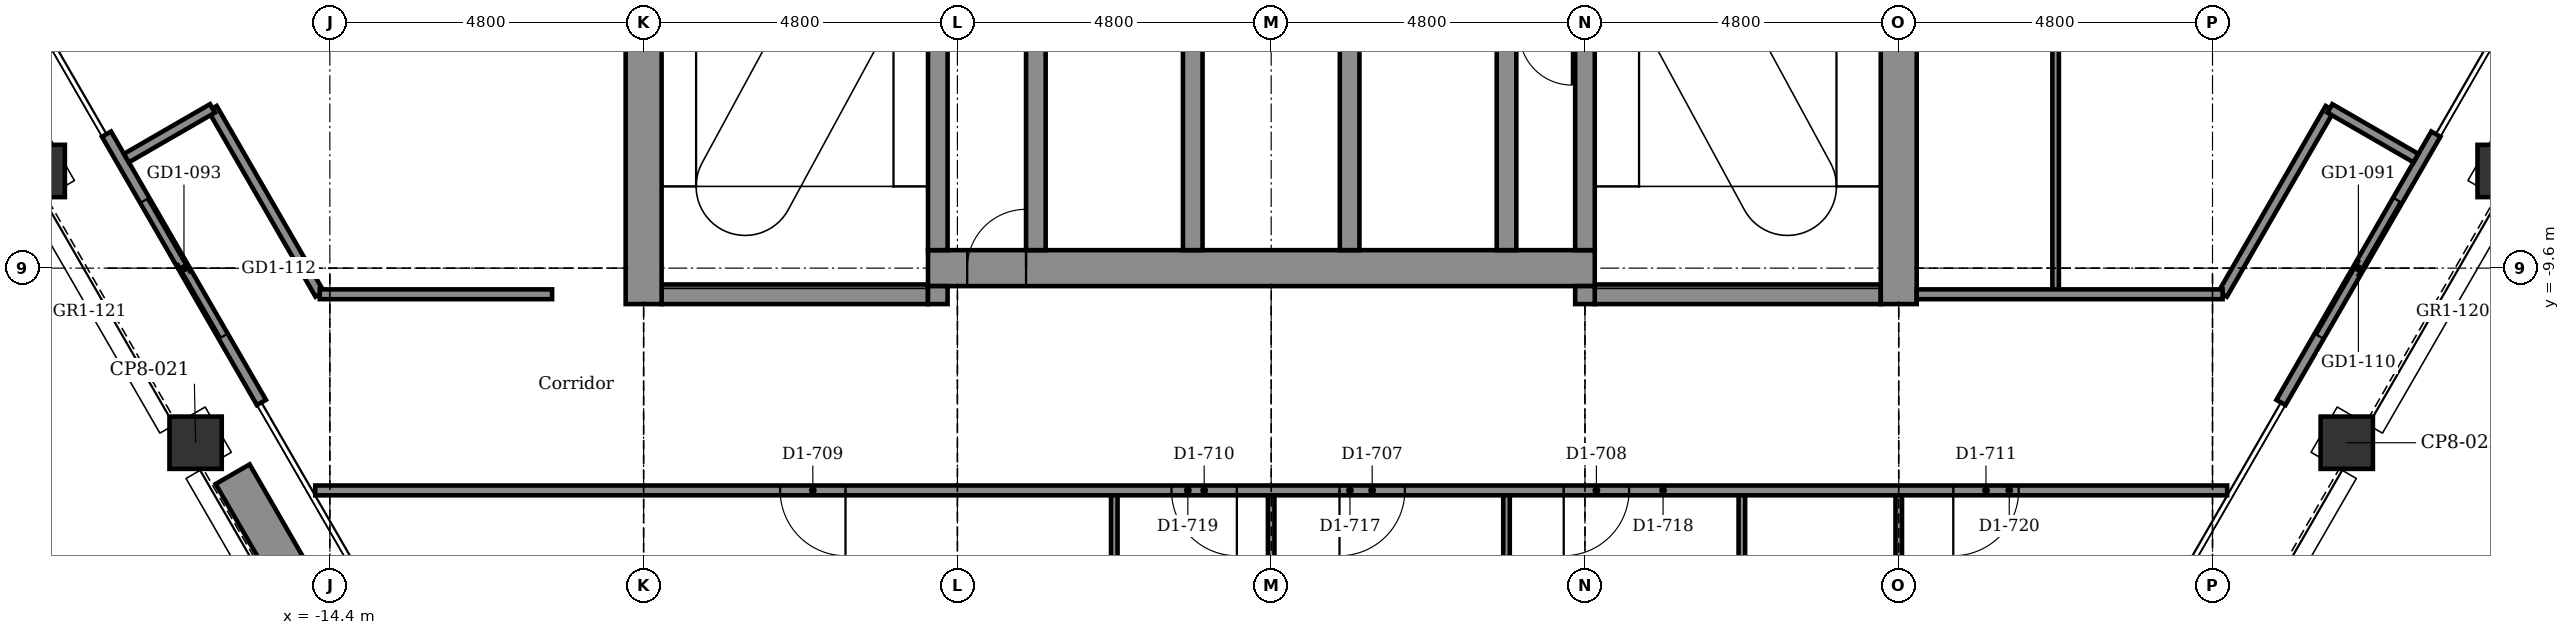
"""IFC4 building model, lengths in metres.
Left out: names, types, materials, properties, quantities, classifications, styles, units other than length and angle.
Written with IfcOpenShell. Run it as: python <this file> out.ifc"""

import sys

from ifc_helpers import new_model, si_unit, direction, frame, frame_2d, origin, origin_2d, place, context, subcontext, project, spatial, rectangle, extrude, element, fill, save


model = new_model("IFC4")
c1 = context("Model", 3, precision=1e-05, world=origin(), true_north=direction((0.0, 1.0)))
c2 = subcontext(c1, "Body", "Model", "MODEL_VIEW")
j1 = project(units=[si_unit("LENGTHUNIT", "METRE"), si_unit("PLANEANGLEUNIT", "RADIAN")], contexts=[c1])
p1 = place(None, origin())
s1 = spatial("IfcSite", under=j1, at=p1, CompositionType="ELEMENT")
p2 = place(p1, origin())
s2 = spatial("IfcBuilding", under=s1, at=p2, CompositionType="ELEMENT")
p3 = place(p2, frame((0.0, 0.0, 257.9)))
s3 = spatial("IfcBuildingStorey", under=s2, at=p3, CompositionType="ELEMENT", Elevation=257.9)
for number, where, z_axis, x_axis in (
    (1, (18.854, -8.114, -0.15), (0.0, 0.0, 1.0), (0.5, 0.866, 0.0)),
    (2, (16.454, -12.271, -0.15), (0.0, 0.0, 1.0), (0.5, 0.866, 0.0)),
    (3, (-16.454, -12.271, -0.15), (0.0, 0.0, 1.0), (0.866, 0.5, 0.0)),
    (4, (-18.854, -8.114, -0.15), (0.0, 0.0, 1.0), (0.866, 0.5, 0.0)),
):
    element("IfcColumn", number, at=place(p3, frame(where, z_axis=z_axis, x_axis=x_axis)), inside=s3, PredefinedType="COLUMN", context=c2, shape_type="SweptSolid", body=[
        extrude(rectangle(XDim=0.8, YDim=0.8, at=origin_2d()), origin(), (0.0, 0.0, 1.0), 3.9),
    ])
p4 = place(p3, frame((-9.325, -10.0, -0.15), z_axis=(0.0, 0.0, 1.0), x_axis=(1.0, 0.0, 0.0)))
e5 = element("IfcWall", 5, at=p4, inside=s3, PredefinedType="STANDARD", context=c2, shape_type="SweptSolid", body=[
    extrude(rectangle(XDim=4.075, YDim=0.3, at=frame_2d((2.038, 0.0))), origin(), (0.0, 0.0, 1.0), 3.9),
])
p5 = place(p3, frame((4.95, -10.0, -0.15), z_axis=(0.0, 0.0, 1.0), x_axis=(1.0, 0.0, 0.0)))
e6 = element("IfcWall", 6, at=p5, inside=s3, PredefinedType="STANDARD", context=c2, shape_type="SweptSolid", body=[
    extrude(rectangle(XDim=4.375, YDim=0.3, at=frame_2d((2.188, 0.0))), origin(), (0.0, 0.0, 1.0), 3.9),
])
p6 = place(p3, frame((-5.25, -9.6, -0.15), z_axis=(0.0, 0.0, 1.0), x_axis=(1.0, 0.0, 0.0)))
e7 = element("IfcWall", 7, at=p6, inside=s3, PredefinedType="SHEAR", context=c2, shape_type="SweptSolid", body=[
    extrude(rectangle(XDim=10.2, YDim=0.55, at=frame_2d((5.1, 0.0))), origin(), (0.0, 0.0, 1.0), 3.9),
])
p7 = place(p6, frame((0.6, 0.0, 0.15)))
e8 = element("IfcOpeningElement", 8, at=p7, cuts=e7, PredefinedType="OPENING", context=c2, shape_type="SweptSolid", body=[
    extrude(rectangle(XDim=0.9, YDim=2.1, at=frame_2d((0.45, 1.05))), frame((0.0, 0.285, 0.0), z_axis=(0.0, -1.0, 0.0), x_axis=(1.0, 0.0, 0.0)), (0.0, 0.0, 1.0), 0.57),
])
p8 = place(p3, frame((-9.6, -10.15, -0.15), z_axis=(0.0, 0.0, 1.0), x_axis=(0.0, 1.0, 0.0)))
e9 = element("IfcWall", 9, at=p8, inside=s3, PredefinedType="SHEAR", context=c2, shape_type="SweptSolid", body=[
    extrude(rectangle(XDim=7.6, YDim=0.55, at=frame_2d((3.8, 0.0))), origin(), (0.0, 0.0, 1.0), 3.9),
])
p9 = place(p3, frame((-5.1, -10.15, -0.15), z_axis=(0.0, 0.0, 1.0), x_axis=(0.0, 1.0, 0.0)))
e10 = element("IfcWall", 10, at=p9, inside=s3, PredefinedType="STANDARD", context=c2, shape_type="SweptSolid", body=[
    extrude(rectangle(XDim=0.275, YDim=0.3, at=frame_2d((0.137, 0.0))), origin(), (0.0, 0.0, 1.0), 3.9),
])
p10 = place(p3, frame((-5.1, -9.325, -0.15), z_axis=(0.0, 0.0, 1.0), x_axis=(0.0, 1.0, 0.0)))
e11 = element("IfcWall", 11, at=p10, inside=s3, PredefinedType="STANDARD", context=c2, shape_type="SweptSolid", body=[
    extrude(rectangle(XDim=7.075, YDim=0.3, at=frame_2d((3.538, 0.0))), origin(), (0.0, 0.0, 1.0), 3.9),
])
p11 = place(p10, frame((3.875, 0.0, 0.15)))
e12 = element("IfcOpeningElement", 12, at=p11, cuts=e11, PredefinedType="OPENING", context=c2, shape_type="SweptSolid", body=[
    extrude(rectangle(XDim=1.2, YDim=2.1, at=frame_2d((0.6, 1.05))), frame((0.0, 0.16, 0.0), z_axis=(0.0, -1.0, 0.0), x_axis=(1.0, 0.0, 0.0)), (0.0, 0.0, 1.0), 0.32),
])
for number, where, z_axis, x_axis in (
    (13, (-3.6, -9.325, -0.15), (0.0, 0.0, 1.0), (0.0, 1.0, 0.0)),
    (14, (-1.2, -9.325, -0.15), (0.0, 0.0, 1.0), (0.0, 1.0, 0.0)),
    (15, (1.2, -9.325, -0.15), (0.0, 0.0, 1.0), (0.0, 1.0, 0.0)),
    (16, (3.6, -9.325, -0.15), (0.0, 0.0, 1.0), (0.0, 1.0, 0.0)),
):
    element("IfcWall", number, at=place(p3, frame(where, z_axis=z_axis, x_axis=x_axis)), inside=s3, PredefinedType="STANDARD", context=c2, shape_type="SweptSolid", body=[
        extrude(rectangle(XDim=3.475, YDim=0.3, at=frame_2d((1.737, 0.0))), origin(), (0.0, 0.0, 1.0), 3.9),
    ])
p12 = place(p3, frame((4.8, -10.15, -0.15), z_axis=(0.0, 0.0, 1.0), x_axis=(0.0, 1.0, 0.0)))
e17 = element("IfcWall", 17, at=p12, inside=s3, PredefinedType="STANDARD", context=c2, shape_type="SweptSolid", body=[
    extrude(rectangle(XDim=0.275, YDim=0.3, at=frame_2d((0.137, 0.0))), origin(), (0.0, 0.0, 1.0), 3.9),
])
p13 = place(p3, frame((4.8, -9.325, -0.15), z_axis=(0.0, 0.0, 1.0), x_axis=(0.0, 1.0, 0.0)))
e18 = element("IfcWall", 18, at=p13, inside=s3, PredefinedType="STANDARD", context=c2, shape_type="SweptSolid", body=[
    extrude(rectangle(XDim=7.075, YDim=0.3, at=frame_2d((3.538, 0.0))), origin(), (0.0, 0.0, 1.0), 3.9),
])
p14 = place(p13, frame((3.875, 0.0, 0.15)))
e19 = element("IfcOpeningElement", 19, at=p14, cuts=e18, PredefinedType="OPENING", context=c2, shape_type="SweptSolid", body=[
    extrude(rectangle(XDim=1.2, YDim=2.1, at=frame_2d((0.6, 1.05))), frame((0.0, 0.16, 0.0), z_axis=(0.0, -1.0, 0.0), x_axis=(1.0, 0.0, 0.0)), (0.0, 0.0, 1.0), 0.32),
])
p15 = place(p3, frame((9.6, -10.15, -0.15), z_axis=(0.0, 0.0, 1.0), x_axis=(0.0, 1.0, 0.0)))
e20 = element("IfcWall", 20, at=p15, inside=s3, PredefinedType="SHEAR", context=c2, shape_type="SweptSolid", body=[
    extrude(rectangle(XDim=20.075, YDim=0.55, at=frame_2d((10.038, 0.0))), origin(), (0.0, 0.0, 1.0), 3.9),
])
p16 = place(p3, frame((17.817, -7.55, 0.0), z_axis=(0.0, 0.0, 1.0), x_axis=(-0.499978080042, -0.866038058908, 0.0)))
e21 = element("IfcWall", 21, at=p16, inside=s3, PredefinedType="PARTITIONING", context=c2, shape_type="SweptSolid", body=[
    extrude(rectangle(XDim=4.74, YDim=0.16, at=frame_2d((2.37, 0.0))), origin(), (0.0, 0.0, 1.0), 3.75),
])
p17 = place(p16, frame((1.17, 0.0, 0.0)))
e22 = element("IfcOpeningElement", 22, at=p17, cuts=e21, PredefinedType="OPENING", context=c2, shape_type="SweptSolid", body=[
    extrude(rectangle(XDim=2.4, YDim=2.4, at=frame_2d((1.2, 1.2))), frame((0.0, 0.09, 0.0), z_axis=(0.0, -1.0, 0.0), x_axis=(1.0, 0.0, 0.0)), (0.0, 0.0, 1.0), 0.18),
])
p18 = place(p3, frame((-15.447, -11.655, 0.0), z_axis=(0.0, 0.0, 1.0), x_axis=(-0.499978080042, 0.866038058908, 0.0)))
e23 = element("IfcWall", 23, at=p18, inside=s3, PredefinedType="PARTITIONING", context=c2, shape_type="SweptSolid", body=[
    extrude(rectangle(XDim=4.74, YDim=0.16, at=frame_2d((2.37, 0.0))), origin(), (0.0, 0.0, 1.0), 3.75),
])
p19 = place(p18, frame((1.17, 0.0, 0.0)))
e24 = element("IfcOpeningElement", 24, at=p19, cuts=e23, PredefinedType="OPENING", context=c2, shape_type="SweptSolid", body=[
    extrude(rectangle(XDim=2.4, YDim=2.4, at=frame_2d((1.2, 1.2))), frame((0.0, 0.09, 0.0), z_axis=(0.0, -1.0, 0.0), x_axis=(1.0, 0.0, 0.0)), (0.0, 0.0, 1.0), 0.18),
])
p20 = place(p3, frame((-14.187, -15.697, 0.0), z_axis=(0.0, 0.0, 1.0), x_axis=(-0.499977295307, 0.866038511948, 0.0)))
e25 = element("IfcWall", 25, at=p20, inside=s3, PredefinedType="USERDEFINED", context=c2, shape_type="SweptSolid", body=[
    extrude(rectangle(XDim=3.4, YDim=0.6, at=frame_2d((1.7, 0.0))), origin(), (0.0, 0.0, 1.0), 0.7),
])
p21 = place(p3, frame((12.0, -10.0, 0.0), z_axis=(0.0, 0.0, 1.0), x_axis=(0.0, 1.0, 0.0)))
e26 = element("IfcWall", 26, at=p21, inside=s3, PredefinedType="PARTITIONING", context=c2, shape_type="SweptSolid", body=[
    extrude(rectangle(XDim=20.0, YDim=0.1, at=frame_2d((10.0, 0.0))), origin(), (0.0, 0.0, 1.0), 3.75),
])
p22 = place(p3, frame((9.6, -19.115, 0.0), z_axis=(0.0, 0.0, 1.0), x_axis=(0.0, 1.0, 0.0)))
e27 = element("IfcWall", 27, at=p22, inside=s3, PredefinedType="PARTITIONING", context=c2, shape_type="SweptSolid", body=[
    extrude(rectangle(XDim=6.115, YDim=0.1, at=frame_2d((3.057, 0.0))), origin(), (0.0, 0.0, 1.0), 3.293),
])
for number, where, z_axis, x_axis in (
    (28, (7.2, -16.6, 0.0), (0.0, 0.0, 1.0), (0.0, 1.0, 0.0)),
    (29, (3.6, -16.6, 0.0), (0.0, 0.0, 1.0), (0.0, 1.0, 0.0)),
):
    element("IfcWall", number, at=place(p3, frame(where, z_axis=z_axis, x_axis=x_axis)), inside=s3, PredefinedType="PARTITIONING", context=c2, shape_type="SweptSolid", body=[
        extrude(rectangle(XDim=3.6, YDim=0.1, at=frame_2d((1.8, 0.0))), origin(), (0.0, 0.0, 1.0), 3.75),
    ])
p23 = place(p3, frame((0.0, -16.6, 0.0), z_axis=(0.0, 0.0, 1.0), x_axis=(0.0, 1.0, 0.0)))
e30 = element("IfcWall", 30, at=p23, inside=s3, PredefinedType="PARTITIONING", context=c2, shape_type="SweptSolid", body=[
    extrude(rectangle(XDim=3.6, YDim=0.1, at=frame_2d((1.8, 0.0))), origin(), (0.0, 0.0, 1.0), 3.217),
])
p24 = place(p3, frame((-2.4, -19.125, 0.0), z_axis=(0.0, 0.0, 1.0), x_axis=(0.0, 1.0, 0.0)))
e31 = element("IfcWall", 31, at=p24, inside=s3, PredefinedType="PARTITIONING", context=c2, shape_type="SweptSolid", body=[
    extrude(rectangle(XDim=6.125, YDim=0.1, at=frame_2d((3.062, 0.0))), origin(), (0.0, 0.0, 1.0), 3.75),
])
for number, where, z_axis, x_axis in (
    (32, (-16.196, -7.157, 0.0), (0.0, 0.0, 1.0), (0.5, -0.866, 0.0)),
    (33, (14.555, -10.0, 0.0), (0.0, 0.0, 1.0), (0.5, 0.866, 0.0)),
):
    element("IfcWall", number, at=place(p3, frame(where, z_axis=z_axis, x_axis=x_axis)), inside=s3, PredefinedType="PARTITIONING", context=c2, shape_type="SweptSolid", body=[
        extrude(rectangle(XDim=3.283, YDim=0.15, at=frame_2d((1.642, 0.0))), origin(), (0.0, 0.0, 1.0), 3.75),
    ])
for number, where, z_axis, x_axis in (
    (34, (16.196, -7.157, 0.0), (0.0, 0.0, 1.0), (0.866, -0.5, 0.0)),
    (35, (-17.512, -7.917, 0.0), (0.0, 0.0, 1.0), (0.866, 0.5, 0.0)),
):
    element("IfcWall", number, at=place(p3, frame(where, z_axis=z_axis, x_axis=x_axis)), inside=s3, PredefinedType="PARTITIONING", context=c2, shape_type="SweptSolid", body=[
        extrude(rectangle(XDim=1.52, YDim=0.15, at=frame_2d((0.76, 0.0))), origin(), (0.0, 0.0, 1.0), 3.75),
    ])
p25 = place(p3, frame((-14.624, -13.0, 0.0), z_axis=(0.0, 0.0, 1.0), x_axis=(1.0, 0.0, 0.0)))
e36 = element("IfcWall", 36, at=p25, inside=s3, PredefinedType="PARTITIONING", context=c2, shape_type="SweptSolid", body=[
    extrude(rectangle(XDim=29.248, YDim=0.15, at=frame_2d((14.624, 0.0))), origin(), (0.0, 0.0, 1.0), 3.75),
])
p26 = place(p25, frame((15.669, 0.0, 0.0)))
e37 = element("IfcOpeningElement", 37, at=p26, cuts=e36, PredefinedType="OPENING", context=c2, shape_type="SweptSolid", body=[
    extrude(rectangle(XDim=1.0, YDim=2.1, at=frame_2d((0.5, 1.05))), frame((0.0, 0.085, 0.0), z_axis=(0.0, -1.0, 0.0), x_axis=(1.0, 0.0, 0.0)), (0.0, 0.0, 1.0), 0.17),
])
p27 = place(p25, frame((19.099, 0.0, 0.0)))
e38 = element("IfcOpeningElement", 38, at=p27, cuts=e36, PredefinedType="OPENING", context=c2, shape_type="SweptSolid", body=[
    extrude(rectangle(XDim=1.0, YDim=2.1, at=frame_2d((0.5, 1.05))), frame((0.0, 0.085, 0.0), z_axis=(0.0, -1.0, 0.0), x_axis=(1.0, 0.0, 0.0)), (0.0, 0.0, 1.0), 0.17),
])
p28 = place(p25, frame((7.112, 0.0, 0.0)))
e39 = element("IfcOpeningElement", 39, at=p28, cuts=e36, PredefinedType="OPENING", context=c2, shape_type="SweptSolid", body=[
    extrude(rectangle(XDim=1.0, YDim=2.1, at=frame_2d((0.5, 1.05))), frame((0.0, 0.085, 0.0), z_axis=(0.0, -1.0, 0.0), x_axis=(1.0, 0.0, 0.0)), (0.0, 0.0, 1.0), 0.17),
])
p29 = place(p25, frame((13.099, 0.0, 0.0)))
e40 = element("IfcOpeningElement", 40, at=p29, cuts=e36, PredefinedType="OPENING", context=c2, shape_type="SweptSolid", body=[
    extrude(rectangle(XDim=1.0, YDim=2.1, at=frame_2d((0.5, 1.05))), frame((0.0, 0.085, 0.0), z_axis=(0.0, -1.0, 0.0), x_axis=(1.0, 0.0, 0.0)), (0.0, 0.0, 1.0), 0.17),
])
p30 = place(p25, frame((25.058, 0.0, 0.0)))
e41 = element("IfcOpeningElement", 41, at=p30, cuts=e36, PredefinedType="OPENING", context=c2, shape_type="SweptSolid", body=[
    extrude(rectangle(XDim=1.0, YDim=2.1, at=frame_2d((0.5, 1.05))), frame((0.0, 0.085, 0.0), z_axis=(0.0, -1.0, 0.0), x_axis=(1.0, 0.0, 0.0)), (0.0, 0.0, 1.0), 0.17),
])
p31 = place(p3, frame((-14.555, -10.0, 0.0), z_axis=(0.0, 0.0, 1.0), x_axis=(1.0, 0.0, 0.0)))
e42 = element("IfcWall", 42, at=p31, inside=s3, PredefinedType="PARTITIONING", context=c2, shape_type="SweptSolid", body=[
    extrude(rectangle(XDim=3.555, YDim=0.15, at=frame_2d((1.777, 0.0))), origin(), (0.0, 0.0, 1.0), 3.75),
])
p32 = place(p3, frame((9.875, -10.0, 0.0), z_axis=(0.0, 0.0, 1.0), x_axis=(1.0, 0.0, 0.0)))
e43 = element("IfcWall", 43, at=p32, inside=s3, PredefinedType="PARTITIONING", context=c2, shape_type="SweptSolid", body=[
    extrude(rectangle(XDim=4.68, YDim=0.15, at=frame_2d((2.34, 0.0))), origin(), (0.0, 0.0, 1.0), 3.75),
])
p33 = place(p17, origin())
e44 = element("IfcDoor", 44, at=p33, inside=s3, OperationType="DOUBLE_DOOR_SLIDING", PredefinedType="DOOR", context=c2, shape_type="SweptSolid", body=[
    extrude(rectangle(XDim=2.4, YDim=2.4, at=frame_2d((1.2, 1.2))), frame((0.0, 0.025, 0.0), z_axis=(0.0, -1.0, 0.0), x_axis=(1.0, 0.0, 0.0)), (0.0, 0.0, 1.0), 0.05),
])
fill(e22, e44)
p34 = place(p19, origin())
e45 = element("IfcDoor", 45, at=p34, inside=s3, OperationType="DOUBLE_DOOR_SLIDING", PredefinedType="DOOR", context=c2, shape_type="SweptSolid", body=[
    extrude(rectangle(XDim=2.4, YDim=2.4, at=frame_2d((1.2, 1.2))), frame((0.0, 0.025, 0.0), z_axis=(0.0, -1.0, 0.0), x_axis=(1.0, 0.0, 0.0)), (0.0, 0.0, 1.0), 0.05),
])
fill(e24, e45)
p35 = place(p26, frame((1.0, 0.0, 0.0), z_axis=(0.0, 0.0, 1.0), x_axis=(-1.0, 0.0, 0.0)))
e46 = element("IfcDoor", 46, at=p35, inside=s3, OperationType="SINGLE_SWING_LEFT", PredefinedType="DOOR", context=c2, shape_type="SweptSolid", body=[
    extrude(rectangle(XDim=1.0, YDim=2.1, at=frame_2d((0.5, 1.05))), frame((0.0, 0.025, 0.0), z_axis=(0.0, -1.0, 0.0), x_axis=(1.0, 0.0, 0.0)), (0.0, 0.0, 1.0), 0.05),
])
fill(e37, e46)
p36 = place(p27, frame((1.0, 0.0, 0.0), z_axis=(0.0, 0.0, 1.0), x_axis=(-1.0, 0.0, 0.0)))
e47 = element("IfcDoor", 47, at=p36, inside=s3, OperationType="SINGLE_SWING_LEFT", PredefinedType="DOOR", context=c2, shape_type="SweptSolid", body=[
    extrude(rectangle(XDim=1.0, YDim=2.1, at=frame_2d((0.5, 1.05))), frame((0.0, 0.025, 0.0), z_axis=(0.0, -1.0, 0.0), x_axis=(1.0, 0.0, 0.0)), (0.0, 0.0, 1.0), 0.05),
])
fill(e38, e47)
p37 = place(p28, frame((1.0, 0.0, 0.0), z_axis=(0.0, 0.0, 1.0), x_axis=(-1.0, 0.0, 0.0)))
e48 = element("IfcDoor", 48, at=p37, inside=s3, OperationType="SINGLE_SWING_RIGHT", PredefinedType="DOOR", context=c2, shape_type="SweptSolid", body=[
    extrude(rectangle(XDim=1.0, YDim=2.1, at=frame_2d((0.5, 1.05))), frame((0.0, 0.025, 0.0), z_axis=(0.0, -1.0, 0.0), x_axis=(1.0, 0.0, 0.0)), (0.0, 0.0, 1.0), 0.05),
])
fill(e39, e48)
p38 = place(p29, frame((1.0, 0.0, 0.0), z_axis=(0.0, 0.0, 1.0), x_axis=(-1.0, 0.0, 0.0)))
e49 = element("IfcDoor", 49, at=p38, inside=s3, OperationType="SINGLE_SWING_RIGHT", PredefinedType="DOOR", context=c2, shape_type="SweptSolid", body=[
    extrude(rectangle(XDim=1.0, YDim=2.1, at=frame_2d((0.5, 1.05))), frame((0.0, 0.025, 0.0), z_axis=(0.0, -1.0, 0.0), x_axis=(1.0, 0.0, 0.0)), (0.0, 0.0, 1.0), 0.05),
])
fill(e40, e49)
p39 = place(p30, frame((1.0, 0.0, 0.0), z_axis=(0.0, 0.0, 1.0), x_axis=(-1.0, 0.0, 0.0)))
e50 = element("IfcDoor", 50, at=p39, inside=s3, OperationType="SINGLE_SWING_LEFT", PredefinedType="DOOR", context=c2, shape_type="SweptSolid", body=[
    extrude(rectangle(XDim=1.0, YDim=2.1, at=frame_2d((0.5, 1.05))), frame((0.0, 0.025, 0.0), z_axis=(0.0, -1.0, 0.0), x_axis=(1.0, 0.0, 0.0)), (0.0, 0.0, 1.0), 0.05),
])
fill(e41, e50)
p40 = place(p7, origin())
e51 = element("IfcDoor", 51, at=p40, inside=s3, OperationType="SINGLE_SWING_RIGHT", PredefinedType="DOOR", context=c2, shape_type="SweptSolid", body=[
    extrude(rectangle(XDim=0.9, YDim=2.1, at=frame_2d((0.45, 1.05))), frame((0.0, 0.025, 0.0), z_axis=(0.0, -1.0, 0.0), x_axis=(1.0, 0.0, 0.0)), (0.0, 0.0, 1.0), 0.05),
])
fill(e8, e51)
save(model, sys.argv[1])
